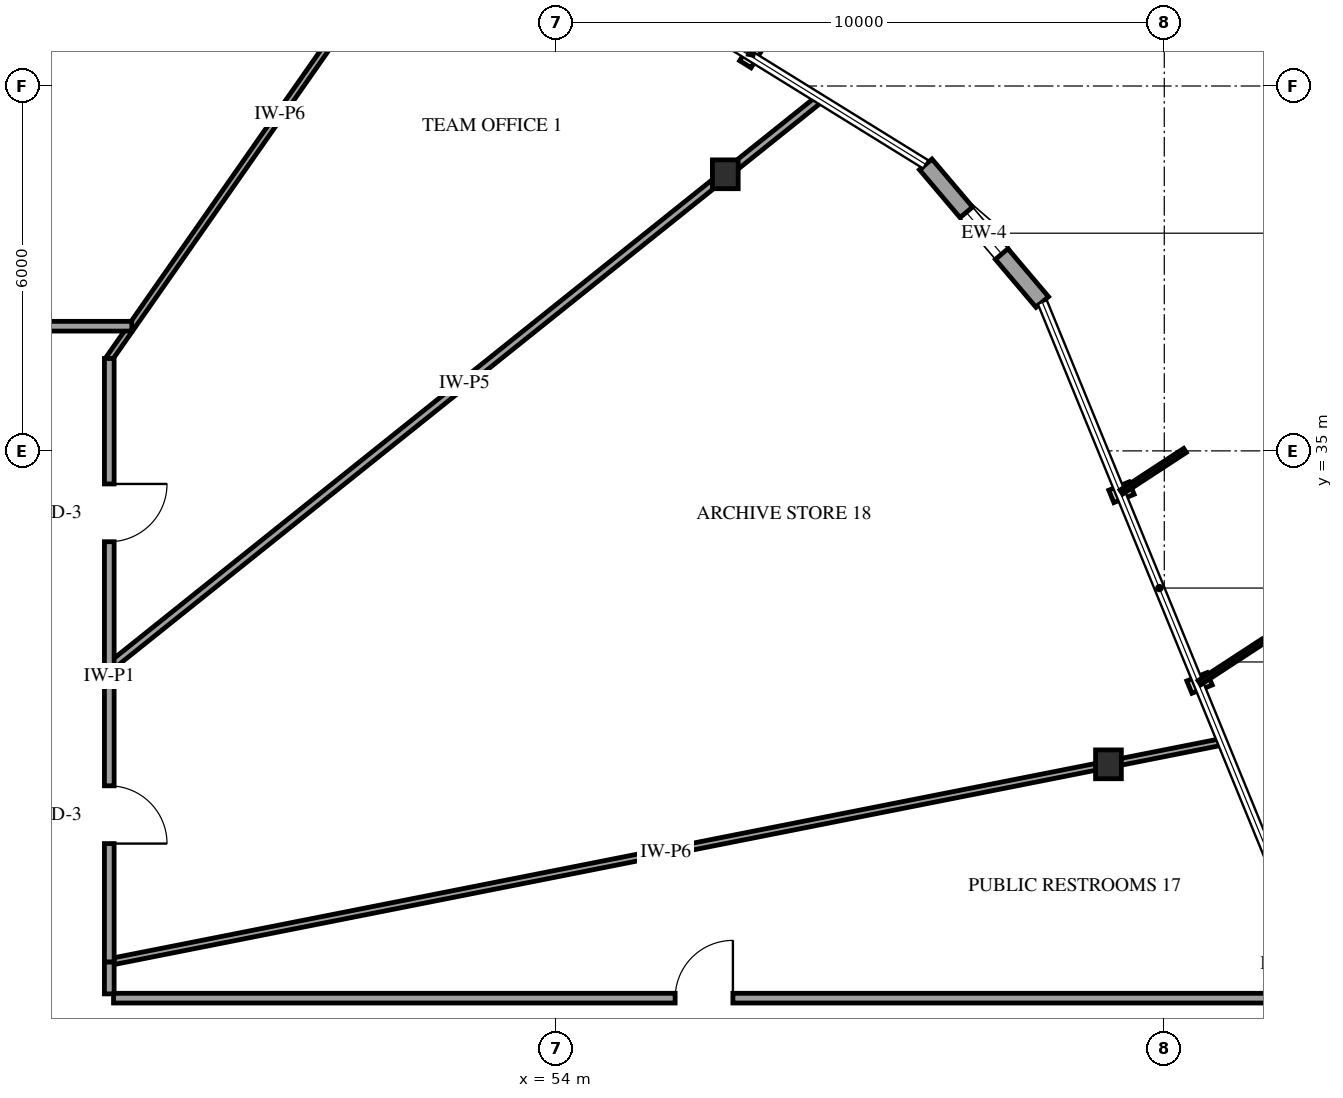
"""IFC4 building model, lengths in metres.
Left out: names, types, materials, properties, quantities, classifications, styles, units other than length and angle.
Written with IfcOpenShell. Run it as: python <this file> out.ifc"""

import sys

from ifc_helpers import new_model, si_unit, direction, frame, frame_2d, origin, origin_2d, place, context, subcontext, project, spatial, rectangle, i_section, extrude, element, fill, save


model = new_model("IFC4")
c1 = context("Model", 3, precision=1e-05, world=origin(), true_north=direction((0.0, 1.0)))
c2 = subcontext(c1, "Body", "Model", "MODEL_VIEW")
j1 = project(units=[si_unit("LENGTHUNIT", "METRE"), si_unit("PLANEANGLEUNIT", "RADIAN")], contexts=[c1])
p1 = place(None, origin())
s1 = spatial("IfcSite", under=j1, at=p1, CompositionType="ELEMENT")
p2 = place(p1, origin())
s2 = spatial("IfcBuilding", under=s1, at=p2, CompositionType="ELEMENT")
p3 = place(p2, frame((0.0, 0.0, 46.6)))
s3 = spatial("IfcBuildingStorey", under=s2, at=p3, CompositionType="ELEMENT", Elevation=46.6)
for number, where, z_axis, x_axis in (
    (1, (63.082, 29.845, 0.0), (0.0, 0.0, 1.0), (1.0, 0.0, 0.0)),
    (2, (56.781, 39.548, 0.0), (0.0, 0.0, 1.0), (1.0, 0.0, 0.0)),
):
    element("IfcColumn", number, at=place(p3, frame(where, z_axis=z_axis, x_axis=x_axis)), inside=s3, PredefinedType="COLUMN", context=c2, shape_type="SweptSolid", body=[
        extrude(i_section(OverallWidth=0.424, OverallDepth=0.474, WebThickness=0.048, FlangeThickness=0.077, FilletRadius=0.038, at=origin_2d()), origin(), (0.0, 0.0, 1.0), 4.0),
    ])
p4 = place(p3, frame((61.994, 37.448, 0.0), z_axis=(0.0, 0.0, 1.0), x_axis=(-0.646259445531, 0.763117768803, 0.0)))
e3 = element("IfcWall", 3, at=p4, inside=s3, PredefinedType="SOLIDWALL", context=c2, shape_type="SweptSolid", body=[
    extrude(rectangle(XDim=2.967, YDim=0.27, at=frame_2d((1.483, 0.0))), origin(), (0.0, 0.0, 1.0), 3.079),
])
p5 = place(p4, frame((1.033, 0.0, 0.75)))
e4 = element("IfcOpeningElement", 4, at=p5, cuts=e3, PredefinedType="OPENING", context=c2, shape_type="SweptSolid", body=[
    extrude(rectangle(XDim=0.9, YDim=1.5, at=frame_2d((0.45, 0.75))), frame((0.0, 0.145, 0.0), z_axis=(0.0, -1.0, 0.0), x_axis=(1.0, 0.0, 0.0)), (0.0, 0.0, 1.0), 0.29),
])
p6 = place(p3, frame((46.72, 26.0, 0.0), z_axis=(0.0, 0.0, 1.0), x_axis=(1.0, 0.0, 0.0)))
e5 = element("IfcWall", 5, at=p6, inside=s3, PredefinedType="PARTITIONING", context=c2, shape_type="SweptSolid", body=[
    extrude(rectangle(XDim=19.421, YDim=0.16, at=frame_2d((9.71, 0.0))), origin(), (0.0, 0.0, 1.0), 3.7),
])
p7 = place(p6, frame((9.236, 0.0, 0.0)))
e6 = element("IfcOpeningElement", 6, at=p7, cuts=e5, PredefinedType="OPENING", context=c2, shape_type="SweptSolid", body=[
    extrude(rectangle(XDim=0.95, YDim=2.15, at=frame_2d((0.475, 1.075))), frame((0.0, 0.09, 0.0), z_axis=(0.0, -1.0, 0.0), x_axis=(1.0, 0.0, 0.0)), (0.0, 0.0, 1.0), 0.18),
])
p8 = place(p3, frame((46.65, 26.593, 0.0), z_axis=(0.0, 0.0, 1.0), x_axis=(0.980968245678, 0.194168228531, 0.0)))
e7 = element("IfcWall", 7, at=p8, inside=s3, PredefinedType="PARTITIONING", context=c2, shape_type="SweptSolid", body=[
    extrude(rectangle(XDim=18.659, YDim=0.11, at=frame_2d((9.33, 0.0))), origin(), (0.0, 0.0, 1.0), 2.995),
])
p9 = place(p3, frame((46.65, 31.442, 0.0), z_axis=(0.0, 0.0, 1.0), x_axis=(0.780814683149, 0.624762699414, 0.0)))
e8 = element("IfcWall", 8, at=p9, inside=s3, PredefinedType="PARTITIONING", context=c2, shape_type="SweptSolid", body=[
    extrude(rectangle(XDim=14.963, YDim=0.13, at=frame_2d((7.481, 0.0))), origin(), (0.0, 0.0, 1.0), 3.7),
])
p10 = place(p3, frame((46.65, 36.519, 0.0), z_axis=(0.0, 0.0, 1.0), x_axis=(0.5729335383, 0.81960183058, 0.0)))
e9 = element("IfcWall", 9, at=p10, inside=s3, PredefinedType="PARTITIONING", context=c2, shape_type="SweptSolid", body=[
    extrude(rectangle(XDim=9.794, YDim=0.11, at=frame_2d((4.897, 0.0))), origin(), (0.0, 0.0, 1.0), 3.7),
])
p11 = place(p3, frame((43.357, 37.05, 0.0), z_axis=(0.0, 0.0, 1.0), x_axis=(0.367220172229, 0.930134046849, 0.0)))
e10 = element("IfcWall", 10, at=p11, inside=s3, PredefinedType="PARTITIONING", context=c2, shape_type="SweptSolid", body=[
    extrude(rectangle(XDim=9.223, YDim=0.14, at=frame_2d((4.612, 0.0))), origin(), (0.0, 0.0, 1.0), 2.995),
])
p12 = place(p3, frame((46.65, 36.519, 0.0), z_axis=(0.0, 0.0, 1.0), x_axis=(0.0, -1.0, 0.0)))
e11 = element("IfcWall", 11, at=p12, inside=s3, PredefinedType="PARTITIONING", context=c2, shape_type="SweptSolid", body=[
    extrude(rectangle(XDim=5.077, YDim=0.16, at=frame_2d((2.539, 0.0))), origin(), (0.0, 0.0, 1.0), 3.7),
])
p13 = place(p12, frame((2.063, 0.0, 0.0)))
e12 = element("IfcOpeningElement", 12, at=p13, cuts=e11, PredefinedType="OPENING", context=c2, shape_type="SweptSolid", body=[
    extrude(rectangle(XDim=0.95, YDim=2.15, at=frame_2d((0.475, 1.075))), frame((0.0, 0.09, 0.0), z_axis=(0.0, -1.0, 0.0), x_axis=(1.0, 0.0, 0.0)), (0.0, 0.0, 1.0), 0.18),
])
p14 = place(p3, frame((46.65, 31.442, 0.0), z_axis=(0.0, 0.0, 1.0), x_axis=(0.0, -1.0, 0.0)))
e13 = element("IfcWall", 13, at=p14, inside=s3, PredefinedType="PARTITIONING", context=c2, shape_type="SweptSolid", body=[
    extrude(rectangle(XDim=4.849, YDim=0.16, at=frame_2d((2.424, 0.0))), origin(), (0.0, 0.0, 1.0), 3.7),
])
p15 = place(p14, frame((1.95, 0.0, 0.0)))
e14 = element("IfcOpeningElement", 14, at=p15, cuts=e13, PredefinedType="OPENING", context=c2, shape_type="SweptSolid", body=[
    extrude(rectangle(XDim=0.95, YDim=2.15, at=frame_2d((0.475, 1.075))), frame((0.0, 0.09, 0.0), z_axis=(0.0, -1.0, 0.0), x_axis=(1.0, 0.0, 0.0)), (0.0, 0.0, 1.0), 0.18),
])
p16 = place(p3, frame((43.357, 37.05, 0.0), z_axis=(0.0, 0.0, 1.0), x_axis=(1.0, 0.0, 0.0)))
e15 = element("IfcWall", 15, at=p16, inside=s3, PredefinedType="PARTITIONING", context=c2, shape_type="SweptSolid", body=[
    extrude(rectangle(XDim=3.664, YDim=0.16, at=frame_2d((1.832, 0.0))), origin(), (0.0, 0.0, 1.0), 3.7),
])
p17 = place(p16, frame((1.357, 0.0, 0.0)))
e16 = element("IfcOpeningElement", 16, at=p17, cuts=e15, PredefinedType="OPENING", context=c2, shape_type="SweptSolid", body=[
    extrude(rectangle(XDim=0.95, YDim=2.15, at=frame_2d((0.475, 1.075))), frame((0.0, 0.09, 0.0), z_axis=(0.0, -1.0, 0.0), x_axis=(1.0, 0.0, 0.0)), (0.0, 0.0, 1.0), 0.18),
])
p18 = place(p3, frame((46.65, 26.593, 0.0), z_axis=(0.0, 0.0, 1.0), x_axis=(0.0, -1.0, 0.0)))
e17 = element("IfcWall", 17, at=p18, inside=s3, PredefinedType="PARTITIONING", context=c2, shape_type="SweptSolid", body=[
    extrude(rectangle(XDim=0.523, YDim=0.16, at=frame_2d((0.261, 0.0))), origin(), (0.0, 0.0, 1.0), 3.7),
])
p19 = place(p5, origin())
e18 = element("IfcWindow", 18, at=p19, inside=s3, PartitioningType="SINGLE_PANEL", PredefinedType="WINDOW", context=c2, shape_type="SweptSolid", body=[
    extrude(rectangle(XDim=0.9, YDim=1.5, at=frame_2d((0.45, 0.75))), frame((0.0, 0.03, 0.0), z_axis=(0.0, -1.0, 0.0), x_axis=(1.0, 0.0, 0.0)), (0.0, 0.0, 1.0), 0.06),
])
fill(e4, e18)
p20 = place(p7, origin())
e19 = element("IfcDoor", 19, at=p20, inside=s3, OperationType="SINGLE_SWING_RIGHT", PredefinedType="DOOR", context=c2, shape_type="SweptSolid", body=[
    extrude(rectangle(XDim=0.95, YDim=2.15, at=frame_2d((0.475, 1.075))), frame((0.0, 0.025, 0.0), z_axis=(0.0, -1.0, 0.0), x_axis=(1.0, 0.0, 0.0)), (0.0, 0.0, 1.0), 0.05),
])
fill(e6, e19)
p21 = place(p13, origin())
e20 = element("IfcDoor", 20, at=p21, inside=s3, OperationType="SINGLE_SWING_LEFT", PredefinedType="DOOR", context=c2, shape_type="SweptSolid", body=[
    extrude(rectangle(XDim=0.95, YDim=2.15, at=frame_2d((0.475, 1.075))), frame((0.0, 0.025, 0.0), z_axis=(0.0, -1.0, 0.0), x_axis=(1.0, 0.0, 0.0)), (0.0, 0.0, 1.0), 0.05),
])
fill(e12, e20)
p22 = place(p15, origin())
e21 = element("IfcDoor", 21, at=p22, inside=s3, OperationType="SINGLE_SWING_RIGHT", PredefinedType="DOOR", context=c2, shape_type="SweptSolid", body=[
    extrude(rectangle(XDim=0.95, YDim=2.15, at=frame_2d((0.475, 1.075))), frame((0.0, 0.025, 0.0), z_axis=(0.0, -1.0, 0.0), x_axis=(1.0, 0.0, 0.0)), (0.0, 0.0, 1.0), 0.05),
])
fill(e14, e21)
save(model, sys.argv[1])
